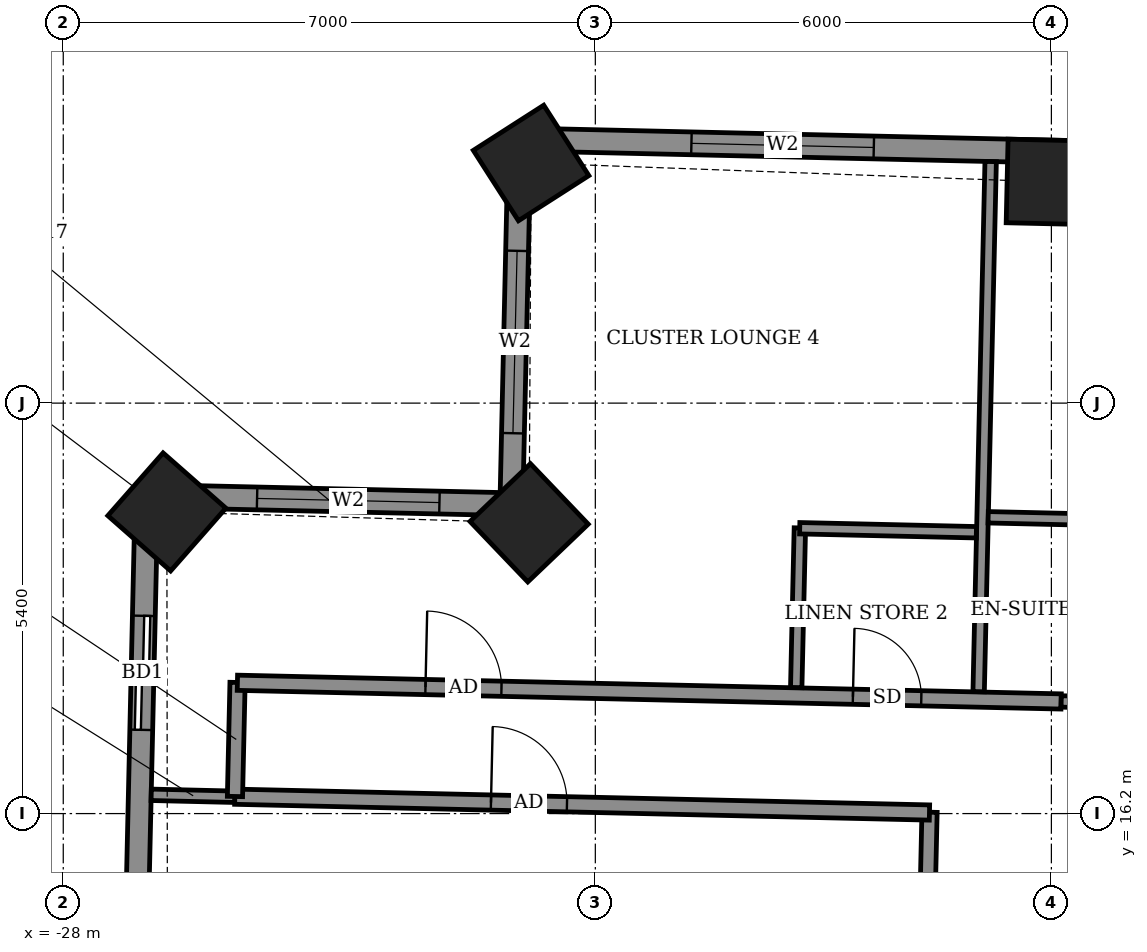
"""IFC4 building model, lengths in metres.
Left out: names, types, materials, properties, quantities, classifications, styles, units other than length and angle.
Written with IfcOpenShell. Run it as: python <this file> out.ifc"""

import sys

from ifc_helpers import new_model, si_unit, direction, frame, frame_2d, origin, origin_2d, place, context, subcontext, project, spatial, rectangle, extrude, element, fill, save


model = new_model("IFC4")
c1 = context("Model", 3, precision=1e-05, world=origin(), true_north=direction((0.0, 1.0)))
c2 = subcontext(c1, "Body", "Model", "MODEL_VIEW")
j1 = project(units=[si_unit("LENGTHUNIT", "METRE"), si_unit("PLANEANGLEUNIT", "RADIAN")], contexts=[c1])
p1 = place(None, origin())
s1 = spatial("IfcSite", under=j1, at=p1, CompositionType="ELEMENT")
p2 = place(p1, origin())
s2 = spatial("IfcBuilding", under=s1, at=p2, CompositionType="ELEMENT")
p3 = place(p2, frame((0.0, 0.0, 212.3)))
s3 = spatial("IfcBuildingStorey", under=s2, at=p3, CompositionType="ELEMENT", Elevation=212.3)
for number, where, z_axis, x_axis in (
    (1, (-15.032, 24.51, -0.55), (0.0, 0.0, 1.0), (-1.0, 0.023, 0.0)),
    (2, (-21.845, 24.759, -0.55), (0.0, 0.0, 1.0), (-0.842, -0.54, 0.0)),
    (3, (-21.871, 20.025, -0.55), (0.0, 0.0, 1.0), (-0.723, -0.691, 0.0)),
    (4, (-26.637, 20.169, -0.55), (0.0, 0.0, 1.0), (-0.661, -0.751, 0.0)),
):
    element("IfcColumn", number, at=place(p3, frame(where, z_axis=z_axis, x_axis=x_axis)), inside=s3, PredefinedType="COLUMN", context=c2, shape_type="SweptSolid", body=[
        extrude(rectangle(XDim=1.1, YDim=1.1, at=origin_2d()), origin(), (0.0, 0.0, 1.0), 3.6),
    ])
p4 = place(p3, frame((20.437, 24.106, 0.0), z_axis=(0.0, 0.0, 1.0), x_axis=(-0.999742506232, 0.022691875925, 0.0)))
e5 = element("IfcWall", 5, at=p4, inside=s3, PredefinedType="SOLIDWALL", context=c2, shape_type="SweptSolid", body=[
    extrude(rectangle(XDim=42.444, YDim=0.3, at=frame_2d((21.222, 0.0))), origin(), (0.0, 0.0, 1.0), 2.55),
])
p5 = place(p4, frame((1.563, 0.0, 0.0)))
e6 = element("IfcOpeningElement", 6, at=p5, cuts=e5, PredefinedType="OPENING", context=c2, shape_type="SweptSolid", body=[
    extrude(rectangle(XDim=1.5, YDim=2.4, at=frame_2d((0.75, 1.2))), frame((0.0, 0.16, 0.0), z_axis=(0.0, -1.0, 0.0), x_axis=(1.0, 0.0, 0.0)), (0.0, 0.0, 1.0), 0.32),
])
p6 = place(p4, frame((4.584, 0.0, 0.0)))
e7 = element("IfcOpeningElement", 7, at=p6, cuts=e5, PredefinedType="OPENING", context=c2, shape_type="SweptSolid", body=[
    extrude(rectangle(XDim=1.5, YDim=2.4, at=frame_2d((0.75, 1.2))), frame((0.0, 0.16, 0.0), z_axis=(0.0, -1.0, 0.0), x_axis=(1.0, 0.0, 0.0)), (0.0, 0.0, 1.0), 0.32),
])
p7 = place(p4, frame((10.269, 0.0, 0.0)))
e8 = element("IfcOpeningElement", 8, at=p7, cuts=e5, PredefinedType="OPENING", context=c2, shape_type="SweptSolid", body=[
    extrude(rectangle(XDim=1.5, YDim=2.4, at=frame_2d((0.75, 1.2))), frame((0.0, 0.16, 0.0), z_axis=(0.0, -1.0, 0.0), x_axis=(1.0, 0.0, 0.0)), (0.0, 0.0, 1.0), 0.32),
])
p8 = place(p4, frame((15.271, 0.0, 0.0)))
e9 = element("IfcOpeningElement", 9, at=p8, cuts=e5, PredefinedType="OPENING", context=c2, shape_type="SweptSolid", body=[
    extrude(rectangle(XDim=1.5, YDim=2.4, at=frame_2d((0.75, 1.2))), frame((0.0, 0.16, 0.0), z_axis=(0.0, -1.0, 0.0), x_axis=(1.0, 0.0, 0.0)), (0.0, 0.0, 1.0), 0.32),
])
p9 = place(p4, frame((18.533, 0.0, 0.0)))
e10 = element("IfcOpeningElement", 10, at=p9, cuts=e5, PredefinedType="OPENING", context=c2, shape_type="SweptSolid", body=[
    extrude(rectangle(XDim=1.5, YDim=2.4, at=frame_2d((0.75, 1.2))), frame((0.0, 0.16, 0.0), z_axis=(0.0, -1.0, 0.0), x_axis=(1.0, 0.0, 0.0)), (0.0, 0.0, 1.0), 0.32),
])
p10 = place(p4, frame((23.819, 0.0, 0.0)))
e11 = element("IfcOpeningElement", 11, at=p10, cuts=e5, PredefinedType="OPENING", context=c2, shape_type="SweptSolid", body=[
    extrude(rectangle(XDim=1.5, YDim=2.4, at=frame_2d((0.75, 1.2))), frame((0.0, 0.16, 0.0), z_axis=(0.0, -1.0, 0.0), x_axis=(1.0, 0.0, 0.0)), (0.0, 0.0, 1.0), 0.32),
])
p11 = place(p4, frame((29.345, 0.0, 0.0)))
e12 = element("IfcOpeningElement", 12, at=p11, cuts=e5, PredefinedType="OPENING", context=c2, shape_type="SweptSolid", body=[
    extrude(rectangle(XDim=1.5, YDim=2.4, at=frame_2d((0.75, 1.2))), frame((0.0, 0.16, 0.0), z_axis=(0.0, -1.0, 0.0), x_axis=(1.0, 0.0, 0.0)), (0.0, 0.0, 1.0), 0.32),
])
p12 = place(p4, frame((32.607, 0.0, 0.0)))
e13 = element("IfcOpeningElement", 13, at=p12, cuts=e5, PredefinedType="OPENING", context=c2, shape_type="SweptSolid", body=[
    extrude(rectangle(XDim=1.5, YDim=2.4, at=frame_2d((0.75, 1.2))), frame((0.0, 0.16, 0.0), z_axis=(0.0, -1.0, 0.0), x_axis=(1.0, 0.0, 0.0)), (0.0, 0.0, 1.0), 0.32),
])
p13 = place(p4, frame((37.783, 0.0, 0.9)))
e14 = element("IfcOpeningElement", 14, at=p13, cuts=e5, PredefinedType="OPENING", context=c2, shape_type="SweptSolid", body=[
    extrude(rectangle(XDim=2.4, YDim=1.5, at=frame_2d((1.2, 0.75))), frame((0.0, 0.16, 0.0), z_axis=(0.0, -1.0, 0.0), x_axis=(1.0, 0.0, 0.0)), (0.0, 0.0, 1.0), 0.32),
])
p14 = place(p3, frame((-21.996, 25.069, 0.0), z_axis=(0.0, 0.0, 1.0), x_axis=(-0.022683280499, -0.999742701292, 0.0)))
e15 = element("IfcWall", 15, at=p14, inside=s3, PredefinedType="SOLIDWALL", context=c2, shape_type="SweptSolid", body=[
    extrude(rectangle(XDim=4.8, YDim=0.3, at=frame_2d((2.4, 0.0))), origin(), (0.0, 0.0, 1.0), 2.55),
])
p15 = place(p14, frame((1.466, 0.0, 0.9)))
e16 = element("IfcOpeningElement", 16, at=p15, cuts=e15, PredefinedType="OPENING", context=c2, shape_type="SweptSolid", body=[
    extrude(rectangle(XDim=2.4, YDim=1.5, at=frame_2d((1.2, 0.75))), frame((0.0, 0.16, 0.0), z_axis=(0.0, -1.0, 0.0), x_axis=(1.0, 0.0, 0.0)), (0.0, 0.0, 1.0), 0.32),
])
p16 = place(p3, frame((-22.105, 20.27, 0.0), z_axis=(0.0, 0.0, 1.0), x_axis=(-0.999742701292, 0.022683280499, 0.0)))
e17 = element("IfcWall", 17, at=p16, inside=s3, PredefinedType="SOLIDWALL", context=c2, shape_type="SweptSolid", body=[
    extrude(rectangle(XDim=4.8, YDim=0.3, at=frame_2d((2.4, 0.0))), origin(), (0.0, 0.0, 1.0), 2.55),
])
p17 = place(p16, frame((0.946, 0.0, 0.9)))
e18 = element("IfcOpeningElement", 18, at=p17, cuts=e17, PredefinedType="OPENING", context=c2, shape_type="SweptSolid", body=[
    extrude(rectangle(XDim=2.4, YDim=1.5, at=frame_2d((1.2, 0.75))), frame((0.0, 0.16, 0.0), z_axis=(0.0, -1.0, 0.0), x_axis=(1.0, 0.0, 0.0)), (0.0, 0.0, 1.0), 0.32),
])
p18 = place(p3, frame((-26.904, 20.379, 0.0), z_axis=(0.0, 0.0, 1.0), x_axis=(-0.022671687694, -0.999742964255, 0.0)))
e19 = element("IfcWall", 19, at=p18, inside=s3, PredefinedType="SOLIDWALL", context=c2, shape_type="SweptSolid", body=[
    extrude(rectangle(XDim=11.824, YDim=0.3, at=frame_2d((5.912, 0.0))), origin(), (0.0, 0.0, 1.0), 2.55),
])
p19 = place(p18, frame((1.578, 0.0, 0.0)))
e20 = element("IfcOpeningElement", 20, at=p19, cuts=e19, PredefinedType="OPENING", context=c2, shape_type="SweptSolid", body=[
    extrude(rectangle(XDim=1.5, YDim=2.4, at=frame_2d((0.75, 1.2))), frame((0.0, 0.16, 0.0), z_axis=(0.0, -1.0, 0.0), x_axis=(1.0, 0.0, 0.0)), (0.0, 0.0, 1.0), 0.32),
])
p20 = place(p18, frame((7.218, 0.0, 0.9)))
e21 = element("IfcOpeningElement", 21, at=p20, cuts=e19, PredefinedType="OPENING", context=c2, shape_type="SweptSolid", body=[
    extrude(rectangle(XDim=2.4, YDim=1.5, at=frame_2d((1.2, 0.75))), frame((0.0, 0.16, 0.0), z_axis=(0.0, -1.0, 0.0), x_axis=(1.0, 0.0, 0.0)), (0.0, 0.0, 1.0), 0.32),
])
p21 = place(p3, frame((-17.247, -12.149, 0.0), z_axis=(0.0, 0.0, 1.0), x_axis=(0.022698146637, 0.999742363881, 0.0)))
e22 = element("IfcWall", 22, at=p21, inside=s3, PredefinedType="PARTITIONING", context=c2, shape_type="SweptSolid", body=[
    extrude(rectangle(XDim=28.374, YDim=0.2, at=frame_2d((14.187, 0.0))), origin(), (0.0, 0.0, 1.0), 3.05),
])
p22 = place(p21, frame((17.225, 0.0, 0.0)))
e23 = element("IfcOpeningElement", 23, at=p22, cuts=e22, PredefinedType="OPENING", context=c2, shape_type="SweptSolid", body=[
    extrude(rectangle(XDim=1.0, YDim=2.1, at=frame_2d((0.5, 1.05))), frame((0.0, 0.11, 0.0), z_axis=(0.0, -1.0, 0.0), x_axis=(1.0, 0.0, 0.0)), (0.0, 0.0, 1.0), 0.22),
])
p23 = place(p21, frame((19.375, 0.0, 0.0)))
e24 = element("IfcOpeningElement", 24, at=p23, cuts=e22, PredefinedType="OPENING", context=c2, shape_type="SweptSolid", body=[
    extrude(rectangle(XDim=0.9, YDim=2.1, at=frame_2d((0.45, 1.05))), frame((0.0, 0.11, 0.0), z_axis=(0.0, -1.0, 0.0), x_axis=(1.0, 0.0, 0.0)), (0.0, 0.0, 1.0), 0.22),
])
p24 = place(p21, frame((13.822, 0.0, 0.0)))
e25 = element("IfcOpeningElement", 25, at=p24, cuts=e22, PredefinedType="OPENING", context=c2, shape_type="SweptSolid", body=[
    extrude(rectangle(XDim=1.0, YDim=2.1, at=frame_2d((0.5, 1.05))), frame((0.0, 0.11, 0.0), z_axis=(0.0, -1.0, 0.0), x_axis=(1.0, 0.0, 0.0)), (0.0, 0.0, 1.0), 0.22),
])
p25 = place(p21, frame((10.25, 0.0, 0.0)))
e26 = element("IfcOpeningElement", 26, at=p25, cuts=e22, PredefinedType="OPENING", context=c2, shape_type="SweptSolid", body=[
    extrude(rectangle(XDim=1.0, YDim=2.1, at=frame_2d((0.5, 1.05))), frame((0.0, 0.11, 0.0), z_axis=(0.0, -1.0, 0.0), x_axis=(1.0, 0.0, 0.0)), (0.0, 0.0, 1.0), 0.22),
])
p26 = place(p21, frame((8.025, 0.0, 0.0)))
e27 = element("IfcOpeningElement", 27, at=p26, cuts=e22, PredefinedType="OPENING", context=c2, shape_type="SweptSolid", body=[
    extrude(rectangle(XDim=0.9, YDim=2.1, at=frame_2d((0.45, 1.05))), frame((0.0, 0.11, 0.0), z_axis=(0.0, -1.0, 0.0), x_axis=(1.0, 0.0, 0.0)), (0.0, 0.0, 1.0), 0.22),
])
p27 = place(p21, frame((5.262, 0.0, 0.0)))
e28 = element("IfcOpeningElement", 28, at=p27, cuts=e22, PredefinedType="OPENING", context=c2, shape_type="SweptSolid", body=[
    extrude(rectangle(XDim=1.0, YDim=2.1, at=frame_2d((0.5, 1.05))), frame((0.0, 0.11, 0.0), z_axis=(0.0, -1.0, 0.0), x_axis=(1.0, 0.0, 0.0)), (0.0, 0.0, 1.0), 0.22),
])
p28 = place(p21, frame((2.825, 0.0, 0.0)))
e29 = element("IfcOpeningElement", 29, at=p28, cuts=e22, PredefinedType="OPENING", context=c2, shape_type="SweptSolid", body=[
    extrude(rectangle(XDim=1.0, YDim=2.1, at=frame_2d((0.5, 1.05))), frame((0.0, 0.11, 0.0), z_axis=(0.0, -1.0, 0.0), x_axis=(1.0, 0.0, 0.0)), (0.0, 0.0, 1.0), 0.22),
])
p29 = place(p21, frame((0.75, 0.0, 0.0)))
e30 = element("IfcOpeningElement", 30, at=p29, cuts=e22, PredefinedType="OPENING", context=c2, shape_type="SweptSolid", body=[
    extrude(rectangle(XDim=0.9, YDim=2.1, at=frame_2d((0.45, 1.05))), frame((0.0, 0.11, 0.0), z_axis=(0.0, -1.0, 0.0), x_axis=(1.0, 0.0, 0.0)), (0.0, 0.0, 1.0), 0.22),
])
p30 = place(p3, frame((-26.843, 16.447, 0.0), z_axis=(0.0, 0.0, 1.0), x_axis=(0.999720170098, -0.023655475055, 0.0)))
e31 = element("IfcWall", 31, at=p30, inside=s3, PredefinedType="PARTITIONING", context=c2, shape_type="SweptSolid", body=[
    extrude(rectangle(XDim=1.104, YDim=0.15, at=frame_2d((0.552, 0.0))), origin(), (0.0, 0.0, 1.0), 2.55),
])
p31 = place(p3, frame((-25.743, 16.422, 0.0), z_axis=(0.0, 0.0, 1.0), x_axis=(0.999741076645, -0.022754772455, 0.0)))
e32 = element("IfcWall", 32, at=p31, inside=s3, PredefinedType="PARTITIONING", context=c2, shape_type="SweptSolid", body=[
    extrude(rectangle(XDim=9.141, YDim=0.2, at=frame_2d((4.571, 0.0))), origin(), (0.0, 0.0, 1.0), 3.05),
])
p32 = place(p31, frame((3.371, 0.0, 0.0)))
e33 = element("IfcOpeningElement", 33, at=p32, cuts=e32, PredefinedType="OPENING", context=c2, shape_type="SweptSolid", body=[
    extrude(rectangle(XDim=1.0, YDim=2.1, at=frame_2d((0.5, 1.05))), frame((0.0, 0.11, 0.0), z_axis=(0.0, -1.0, 0.0), x_axis=(1.0, 0.0, 0.0)), (0.0, 0.0, 1.0), 0.22),
])
p33 = place(p3, frame((-25.741, 16.425, 0.0), z_axis=(0.0, 0.0, 1.0), x_axis=(0.022617910375, 0.999744182344, 0.0)))
e34 = element("IfcWall", 34, at=p33, inside=s3, PredefinedType="PARTITIONING", context=c2, shape_type="SweptSolid", body=[
    extrude(rectangle(XDim=1.5, YDim=0.2, at=frame_2d((0.75, 0.0))), origin(), (0.0, 0.0, 1.0), 3.05),
])
p34 = place(p3, frame((-25.709, 17.921, 0.0), z_axis=(0.0, 0.0, 1.0), x_axis=(0.999742764922, -0.022680475901, 0.0)))
e35 = element("IfcWall", 35, at=p34, inside=s3, PredefinedType="PARTITIONING", context=c2, shape_type="SweptSolid", body=[
    extrude(rectangle(XDim=10.84, YDim=0.2, at=frame_2d((5.42, 0.0))), origin(), (0.0, 0.0, 1.0), 3.05),
])
p35 = place(p34, frame((2.475, 0.0, 0.0)))
e36 = element("IfcOpeningElement", 36, at=p35, cuts=e35, PredefinedType="OPENING", context=c2, shape_type="SweptSolid", body=[
    extrude(rectangle(XDim=1.0, YDim=2.1, at=frame_2d((0.5, 1.05))), frame((0.0, 0.11, 0.0), z_axis=(0.0, -1.0, 0.0), x_axis=(1.0, 0.0, 0.0)), (0.0, 0.0, 1.0), 0.22),
])
p36 = place(p34, frame((8.1, 0.0, 0.0)))
e37 = element("IfcOpeningElement", 37, at=p36, cuts=e35, PredefinedType="OPENING", context=c2, shape_type="SweptSolid", body=[
    extrude(rectangle(XDim=0.9, YDim=2.1, at=frame_2d((0.45, 1.05))), frame((0.0, 0.11, 0.0), z_axis=(0.0, -1.0, 0.0), x_axis=(1.0, 0.0, 0.0)), (0.0, 0.0, 1.0), 0.22),
])
p37 = place(p3, frame((-14.871, 17.675, 0.0), z_axis=(0.0, 0.0, 1.0), x_axis=(0.999742359486, -0.02269834024, 0.0)))
e38 = element("IfcWall", 38, at=p37, inside=s3, PredefinedType="PARTITIONING", context=c2, shape_type="SweptSolid", body=[
    extrude(rectangle(XDim=30.536, YDim=0.15, at=frame_2d((15.268, 0.0))), origin(), (0.0, 0.0, 1.0), 3.05),
])
p38 = place(p37, frame((29.436, 0.0, 0.0)))
e39 = element("IfcOpeningElement", 39, at=p38, cuts=e38, PredefinedType="OPENING", context=c2, shape_type="SweptSolid", body=[
    extrude(rectangle(XDim=0.9, YDim=2.1, at=frame_2d((0.45, 1.05))), frame((0.0, 0.085, 0.0), z_axis=(0.0, -1.0, 0.0), x_axis=(1.0, 0.0, 0.0)), (0.0, 0.0, 1.0), 0.17),
])
p39 = place(p37, frame((22.484, 0.0, 0.0)))
e40 = element("IfcOpeningElement", 40, at=p39, cuts=e38, PredefinedType="OPENING", context=c2, shape_type="SweptSolid", body=[
    extrude(rectangle(XDim=0.9, YDim=2.1, at=frame_2d((0.45, 1.05))), frame((0.0, 0.085, 0.0), z_axis=(0.0, -1.0, 0.0), x_axis=(1.0, 0.0, 0.0)), (0.0, 0.0, 1.0), 0.17),
])
p40 = place(p37, frame((20.434, 0.0, 0.0)))
e41 = element("IfcOpeningElement", 41, at=p40, cuts=e38, PredefinedType="OPENING", context=c2, shape_type="SweptSolid", body=[
    extrude(rectangle(XDim=0.9, YDim=2.1, at=frame_2d((0.45, 1.05))), frame((0.0, 0.085, 0.0), z_axis=(0.0, -1.0, 0.0), x_axis=(1.0, 0.0, 0.0)), (0.0, 0.0, 1.0), 0.17),
])
p41 = place(p37, frame((13.484, 0.0, 0.0)))
e42 = element("IfcOpeningElement", 42, at=p41, cuts=e38, PredefinedType="OPENING", context=c2, shape_type="SweptSolid", body=[
    extrude(rectangle(XDim=0.9, YDim=2.1, at=frame_2d((0.45, 1.05))), frame((0.0, 0.085, 0.0), z_axis=(0.0, -1.0, 0.0), x_axis=(1.0, 0.0, 0.0)), (0.0, 0.0, 1.0), 0.17),
])
p42 = place(p37, frame((11.334, 0.0, 0.0)))
e43 = element("IfcOpeningElement", 43, at=p42, cuts=e38, PredefinedType="OPENING", context=c2, shape_type="SweptSolid", body=[
    extrude(rectangle(XDim=0.9, YDim=2.1, at=frame_2d((0.45, 1.05))), frame((0.0, 0.085, 0.0), z_axis=(0.0, -1.0, 0.0), x_axis=(1.0, 0.0, 0.0)), (0.0, 0.0, 1.0), 0.17),
])
p43 = place(p37, frame((4.359, 0.0, 0.0)))
e44 = element("IfcOpeningElement", 44, at=p43, cuts=e38, PredefinedType="OPENING", context=c2, shape_type="SweptSolid", body=[
    extrude(rectangle(XDim=0.9, YDim=2.1, at=frame_2d((0.45, 1.05))), frame((0.0, 0.085, 0.0), z_axis=(0.0, -1.0, 0.0), x_axis=(1.0, 0.0, 0.0)), (0.0, 0.0, 1.0), 0.17),
])
p44 = place(p37, frame((2.009, 0.0, 0.0)))
e45 = element("IfcOpeningElement", 45, at=p44, cuts=e38, PredefinedType="OPENING", context=c2, shape_type="SweptSolid", body=[
    extrude(rectangle(XDim=0.9, YDim=2.1, at=frame_2d((0.45, 1.05))), frame((0.0, 0.085, 0.0), z_axis=(0.0, -1.0, 0.0), x_axis=(1.0, 0.0, 0.0)), (0.0, 0.0, 1.0), 0.17),
])
p45 = place(p3, frame((-18.357, 17.858, 0.0), z_axis=(0.0, 0.0, 1.0), x_axis=(0.022779486249, 0.999740513837, 0.0)))
e46 = element("IfcWall", 46, at=p45, inside=s3, PredefinedType="PARTITIONING", context=c2, shape_type="SweptSolid", body=[
    extrude(rectangle(XDim=2.101, YDim=0.15, at=frame_2d((1.05, 0.0))), origin(), (0.0, 0.0, 1.0), 3.05),
])
p46 = place(p3, frame((-15.957, 17.804, 0.0), z_axis=(0.0, 0.0, 1.0), x_axis=(0.022643496158, 0.999743603171, 0.0)))
e47 = element("IfcWall", 47, at=p46, inside=s3, PredefinedType="PARTITIONING", context=c2, shape_type="SweptSolid", body=[
    extrude(rectangle(XDim=6.976, YDim=0.15, at=frame_2d((3.488, 0.0))), origin(), (0.0, 0.0, 1.0), 2.55),
])
for number, where, z_axis, x_axis in (
    (48, (-18.311, 19.954, 0.0), (0.0, 0.0, 1.0), (1.0, -0.023, 0.0)),
    (49, (-15.832, 20.098, 0.0), (0.0, 0.0, 1.0), (1.0, -0.023, 0.0)),
):
    element("IfcWall", number, at=place(p3, frame(where, z_axis=z_axis, x_axis=x_axis)), inside=s3, PredefinedType="PARTITIONING", context=c2, shape_type="SweptSolid", body=[
        extrude(rectangle(XDim=2.324, YDim=0.15, at=frame_2d((1.162, 0.0))), origin(), (0.0, 0.0, 1.0), 3.05),
    ])
p47 = place(p13, origin())
e50 = element("IfcWindow", 50, at=p47, inside=s3, PartitioningType="DOUBLE_PANEL_VERTICAL", PredefinedType="WINDOW", context=c2, shape_type="SweptSolid", body=[
    extrude(rectangle(XDim=2.4, YDim=1.5, at=frame_2d((1.2, 0.75))), frame((0.0, 0.03, 0.0), z_axis=(0.0, -1.0, 0.0), x_axis=(1.0, 0.0, 0.0)), (0.0, 0.0, 1.0), 0.06),
])
fill(e14, e50)
p48 = place(p15, origin())
e51 = element("IfcWindow", 51, at=p48, inside=s3, PartitioningType="DOUBLE_PANEL_VERTICAL", PredefinedType="WINDOW", context=c2, shape_type="SweptSolid", body=[
    extrude(rectangle(XDim=2.4, YDim=1.5, at=frame_2d((1.2, 0.75))), frame((0.0, 0.03, 0.0), z_axis=(0.0, -1.0, 0.0), x_axis=(1.0, 0.0, 0.0)), (0.0, 0.0, 1.0), 0.06),
])
fill(e16, e51)
p49 = place(p17, origin())
e52 = element("IfcWindow", 52, at=p49, inside=s3, PartitioningType="DOUBLE_PANEL_VERTICAL", PredefinedType="WINDOW", context=c2, shape_type="SweptSolid", body=[
    extrude(rectangle(XDim=2.4, YDim=1.5, at=frame_2d((1.2, 0.75))), frame((0.0, 0.03, 0.0), z_axis=(0.0, -1.0, 0.0), x_axis=(1.0, 0.0, 0.0)), (0.0, 0.0, 1.0), 0.06),
])
fill(e18, e52)
p50 = place(p19, origin())
e53 = element("IfcDoor", 53, at=p50, inside=s3, OperationType="SLIDING_TO_LEFT", PredefinedType="DOOR", context=c2, shape_type="SweptSolid", body=[
    extrude(rectangle(XDim=1.5, YDim=2.4, at=frame_2d((0.75, 1.2))), frame((0.0, 0.025, 0.0), z_axis=(0.0, -1.0, 0.0), x_axis=(1.0, 0.0, 0.0)), (0.0, 0.0, 1.0), 0.05),
])
fill(e20, e53)
p51 = place(p35, origin())
e54 = element("IfcDoor", 54, at=p51, inside=s3, OperationType="SINGLE_SWING_RIGHT", PredefinedType="DOOR", context=c2, shape_type="SweptSolid", body=[
    extrude(rectangle(XDim=1.0, YDim=2.1, at=frame_2d((0.5, 1.05))), frame((0.0, 0.025, 0.0), z_axis=(0.0, -1.0, 0.0), x_axis=(1.0, 0.0, 0.0)), (0.0, 0.0, 1.0), 0.05),
])
fill(e36, e54)
p52 = place(p36, origin())
e55 = element("IfcDoor", 55, at=p52, inside=s3, OperationType="SINGLE_SWING_LEFT", PredefinedType="DOOR", context=c2, shape_type="SweptSolid", body=[
    extrude(rectangle(XDim=0.9, YDim=2.1, at=frame_2d((0.45, 1.05))), frame((0.0, 0.025, 0.0), z_axis=(0.0, -1.0, 0.0), x_axis=(1.0, 0.0, 0.0)), (0.0, 0.0, 1.0), 0.05),
])
fill(e37, e55)
p53 = place(p32, origin())
e56 = element("IfcDoor", 56, at=p53, inside=s3, OperationType="SINGLE_SWING_LEFT", PredefinedType="DOOR", context=c2, shape_type="SweptSolid", body=[
    extrude(rectangle(XDim=1.0, YDim=2.1, at=frame_2d((0.5, 1.05))), frame((0.0, 0.025, 0.0), z_axis=(0.0, -1.0, 0.0), x_axis=(1.0, 0.0, 0.0)), (0.0, 0.0, 1.0), 0.05),
])
fill(e33, e56)
save(model, sys.argv[1])
